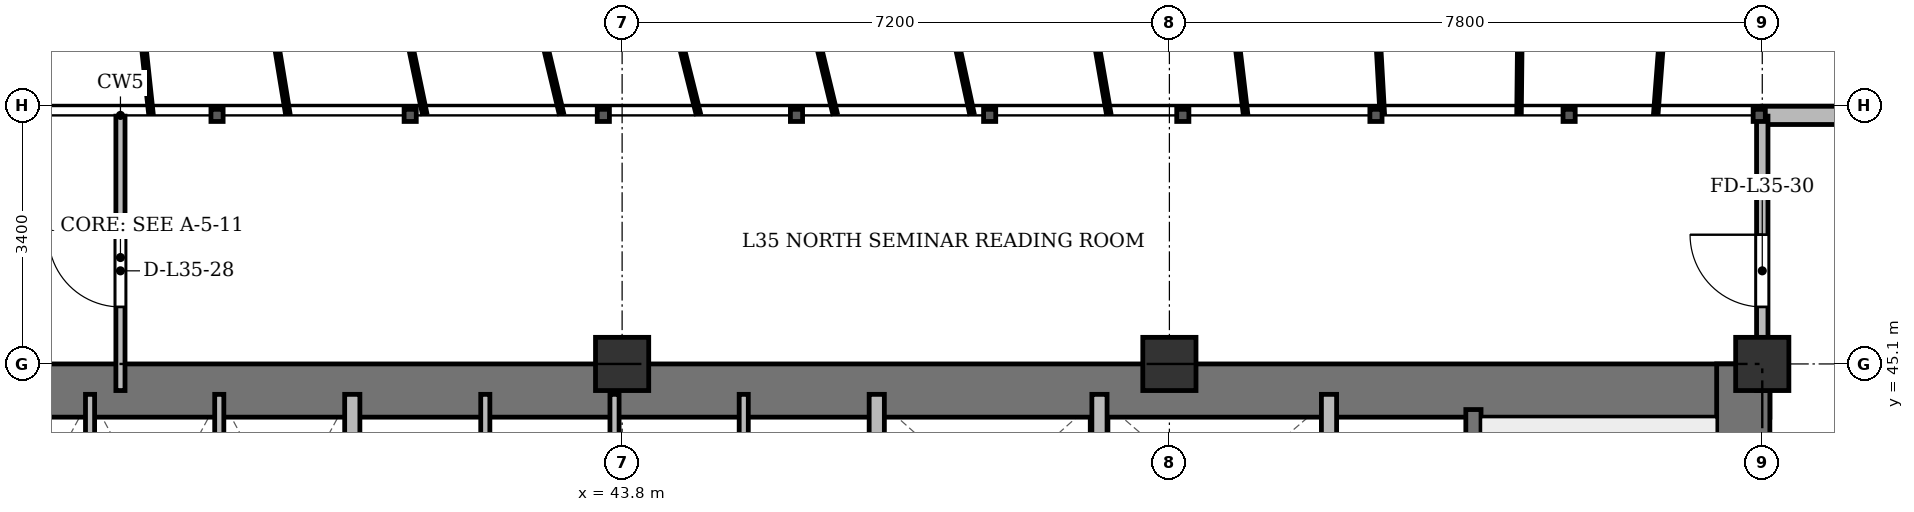
"""IFC4 building model, lengths in metres.
Left out: names, types, materials, properties, quantities, classifications, styles, units other than length and angle.
Written with IfcOpenShell. Run it as: python <this file> out.ifc"""

import sys

from ifc_helpers import new_model, si_unit, direction, frame, frame_2d, origin, origin_2d, place, context, subcontext, project, spatial, rectangle, extrude, source, transform, mapped, element, fill, save


model = new_model("IFC4")
c1 = context("Model", 3, precision=1e-05, world=origin(), true_north=direction((0.0, 1.0)))
c2 = subcontext(c1, "Body", "Model", "MODEL_VIEW")
j1 = project(units=[si_unit("LENGTHUNIT", "METRE"), si_unit("PLANEANGLEUNIT", "RADIAN")], contexts=[c1])
p1 = place(None, origin())
s1 = spatial("IfcSite", under=j1, at=p1, CompositionType="ELEMENT")
p2 = place(p1, origin())
s2 = spatial("IfcBuilding", under=s1, at=p2, CompositionType="ELEMENT")
p3 = place(p2, frame((0.0, 0.0, 135.7)))
s3 = spatial("IfcBuildingStorey", under=s2, at=p3, CompositionType="ELEMENT", Elevation=135.7)
m1 = source(origin(), c2, "Body", "SweptSolid", [
    extrude(rectangle(XDim=0.7, YDim=0.7, at=origin_2d()), origin(), (0.0, 0.0, 1.0), 3.6),
])
for number, where, z_axis, x_axis in (
    (1, (43.8, 45.1, 0.0), (0.0, 0.0, 1.0), (1.0, 0.0, 0.0)),
    (2, (51.0, 45.1, 0.0), (0.0, 0.0, 1.0), (1.0, 0.0, 0.0)),
    (3, (58.8, 45.1, 0.0), (0.0, 0.0, 1.0), (1.0, 0.0, 0.0)),
):
    element("IfcColumn", number, at=place(p3, frame(where, z_axis=z_axis, x_axis=x_axis)), inside=s3, PredefinedType="COLUMN", context=c2, shape_type="MappedRepresentation", body=[
        mapped(m1, transform((0.0, 0.0, 0.0), x_axis=(1.0, 0.0, 0.0), y_axis=(0.0, 1.0, 0.0), z_axis=(0.0, 0.0, 1.0), scale=1.0)),
    ])
p4 = place(p3, frame((58.8, 48.37, 0.0), z_axis=(0.0, 0.0, 1.0), x_axis=(1.0, 0.0, 0.0)))
e4 = element("IfcWall", 4, at=p4, inside=s3, PredefinedType="SOLIDWALL", context=c2, shape_type="SweptSolid", body=[
    extrude(rectangle(XDim=4.7, YDim=0.24, at=frame_2d((2.35, 0.0))), origin(), (0.0, 0.0, 1.0), 3.35),
])
p5 = place(p4, frame((1.293, 0.0, 0.9)))
e5 = element("IfcOpeningElement", 5, at=p5, cuts=e4, PredefinedType="OPENING", context=c2, shape_type="SweptSolid", body=[
    extrude(rectangle(XDim=1.35, YDim=1.5, at=frame_2d((0.675, 0.75))), frame((0.0, 0.13, 0.0), z_axis=(0.0, -1.0, 0.0), x_axis=(1.0, 0.0, 0.0)), (0.0, 0.0, 1.0), 0.26),
])
p6 = place(p3, frame((15.5, 44.75, 0.0), z_axis=(0.0, 0.0, 1.0), x_axis=(1.0, 0.0, 0.0)))
e6 = element("IfcWall", 6, at=p6, inside=s3, PredefinedType="SHEAR", context=c2, shape_type="SweptSolid", body=[
    extrude(rectangle(XDim=43.4, YDim=0.7, at=frame_2d((21.7, 0.0))), origin(), (0.0, 0.0, 1.0), 3.35),
])
p7 = place(p3, frame((58.55, 33.4, 0.0), z_axis=(0.0, 0.0, 1.0), x_axis=(0.0, 1.0, 0.0)))
e7 = element("IfcWall", 7, at=p7, inside=s3, PredefinedType="SHEAR", context=c2, shape_type="SweptSolid", body=[
    extrude(rectangle(XDim=11.7, YDim=0.7, at=frame_2d((5.85, 0.0))), origin(), (0.0, 0.0, 1.0), 3.35),
])
p8 = place(p3, frame((55.0, 33.4, 0.0), z_axis=(0.0, 0.0, 1.0), x_axis=(0.0, 1.0, 0.0)))
e8 = element("IfcWall", 8, at=p8, inside=s3, PredefinedType="SHEAR", context=c2, shape_type="SweptSolid", body=[
    extrude(rectangle(XDim=11.1, YDim=0.2, at=frame_2d((5.55, 0.0))), origin(), (0.0, 0.0, 1.0), 3.35),
])
p9 = place(p8, frame((0.85, 0.0, 0.0)))
e9 = element("IfcOpeningElement", 9, at=p9, cuts=e8, PredefinedType="OPENING", context=c2, shape_type="SweptSolid", body=[
    extrude(rectangle(XDim=1.1, YDim=2.15, at=frame_2d((0.55, 1.075))), frame((0.0, 0.11, 0.0), z_axis=(0.0, -1.0, 0.0), x_axis=(1.0, 0.0, 0.0)), (0.0, 0.0, 1.0), 0.22),
])
for number, where, z_axis, x_axis in (
    (10, (36.8, 41.5, 0.0), (0.0, 0.0, 1.0), (0.0, 1.0, 0.0)),
    (11, (38.5, 41.5, 0.0), (0.0, 0.0, 1.0), (0.0, 1.0, 0.0)),
):
    element("IfcWall", number, at=place(p3, frame(where, z_axis=z_axis, x_axis=x_axis)), inside=s3, PredefinedType="PARTITIONING", context=c2, shape_type="SweptSolid", body=[
        extrude(rectangle(XDim=3.2, YDim=0.12, at=frame_2d((1.6, 0.0))), origin(), (0.0, 0.0, 1.0), 3.35),
    ])
p10 = place(p3, frame((40.25, 41.5, 0.0), z_axis=(0.0, 0.0, 1.0), x_axis=(0.0, 1.0, 0.0)))
e12 = element("IfcWall", 12, at=p10, inside=s3, PredefinedType="SOLIDWALL", context=c2, shape_type="SweptSolid", body=[
    extrude(rectangle(XDim=3.2, YDim=0.2, at=frame_2d((1.6, 0.0))), origin(), (0.0, 0.0, 1.0), 3.35),
])
p11 = place(p3, frame((42.0, 41.5, 0.0), z_axis=(0.0, 0.0, 1.0), x_axis=(0.0, 1.0, 0.0)))
e13 = element("IfcWall", 13, at=p11, inside=s3, PredefinedType="PARTITIONING", context=c2, shape_type="SweptSolid", body=[
    extrude(rectangle(XDim=3.2, YDim=0.12, at=frame_2d((1.6, 0.0))), origin(), (0.0, 0.0, 1.0), 3.35),
])
p12 = place(p3, frame((43.7, 41.5, 0.0), z_axis=(0.0, 0.0, 1.0), x_axis=(0.0, 1.0, 0.0)))
e14 = element("IfcWall", 14, at=p12, inside=s3, PredefinedType="PARTITIONING", context=c2, shape_type="SweptSolid", body=[
    extrude(rectangle(XDim=3.2, YDim=0.12, at=frame_2d((1.6, 0.0))), origin(), (0.0, 0.0, 1.0), 2.85),
])
p13 = place(p3, frame((45.4, 41.5, 0.0), z_axis=(0.0, 0.0, 1.0), x_axis=(0.0, 1.0, 0.0)))
e15 = element("IfcWall", 15, at=p13, inside=s3, PredefinedType="PARTITIONING", context=c2, shape_type="SweptSolid", body=[
    extrude(rectangle(XDim=3.2, YDim=0.12, at=frame_2d((1.6, 0.0))), origin(), (0.0, 0.0, 1.0), 3.35),
])
p14 = place(p3, frame((47.15, 33.4, 0.0), z_axis=(0.0, 0.0, 1.0), x_axis=(0.0, 1.0, 0.0)))
e16 = element("IfcWall", 16, at=p14, inside=s3, PredefinedType="SOLIDWALL", context=c2, shape_type="SweptSolid", body=[
    extrude(rectangle(XDim=11.3, YDim=0.2, at=frame_2d((5.65, 0.0))), origin(), (0.0, 0.0, 1.0), 2.75),
])
for number, where, z_axis, x_axis in (
    (17, (50.08, 42.05, 0.0), (0.0, 0.0, 1.0), (0.0, 1.0, 0.0)),
    (18, (53.1, 42.05, 0.0), (0.0, 0.0, 1.0), (0.0, 1.0, 0.0)),
):
    element("IfcWall", number, at=place(p3, frame(where, z_axis=z_axis, x_axis=x_axis)), inside=s3, PredefinedType="SOLIDWALL", context=c2, shape_type="SweptSolid", body=[
        extrude(rectangle(XDim=2.65, YDim=0.2, at=frame_2d((1.325, 0.0))), origin(), (0.0, 0.0, 1.0), 3.35),
    ])
p15 = place(p3, frame((37.2, 44.75, 0.0), z_axis=(0.0, 0.0, 1.0), x_axis=(0.0, 1.0, 0.0)))
e19 = element("IfcWall", 19, at=p15, inside=s3, PredefinedType="PARTITIONING", context=c2, shape_type="SweptSolid", body=[
    extrude(rectangle(XDim=3.61, YDim=0.12, at=frame_2d((1.805, 0.0))), origin(), (0.0, 0.0, 1.0), 2.75),
])
p16 = place(p15, frame((1.1, 0.0, 0.0)))
e20 = element("IfcOpeningElement", 20, at=p16, cuts=e19, PredefinedType="OPENING", context=c2, shape_type="SweptSolid", body=[
    extrude(rectangle(XDim=0.95, YDim=2.15, at=frame_2d((0.475, 1.075))), frame((0.0, 0.07, 0.0), z_axis=(0.0, -1.0, 0.0), x_axis=(1.0, 0.0, 0.0)), (0.0, 0.0, 1.0), 0.14),
])
p17 = place(p3, frame((58.8, 44.75, 0.0), z_axis=(0.0, 0.0, 1.0), x_axis=(0.0, 1.0, 0.0)))
e21 = element("IfcWall", 21, at=p17, inside=s3, PredefinedType="PARTITIONING", context=c2, shape_type="SweptSolid", body=[
    extrude(rectangle(XDim=3.61, YDim=0.15, at=frame_2d((1.805, 0.0))), origin(), (0.0, 0.0, 1.0), 2.85),
])
p18 = place(p17, frame((1.1, 0.0, 0.0)))
e22 = element("IfcOpeningElement", 22, at=p18, cuts=e21, PredefinedType="OPENING", context=c2, shape_type="SweptSolid", body=[
    extrude(rectangle(XDim=0.95, YDim=2.15, at=frame_2d((0.475, 1.075))), frame((0.0, 0.085, 0.0), z_axis=(0.0, -1.0, 0.0), x_axis=(1.0, 0.0, 0.0)), (0.0, 0.0, 1.0), 0.17),
])
m2 = source(origin(), c2, "Body", "SweptSolid", [
    extrude(rectangle(XDim=0.95, YDim=2.15, at=frame_2d((0.475, 1.075))), frame((0.0, 0.025, 0.0), z_axis=(0.0, -1.0, 0.0), x_axis=(1.0, 0.0, 0.0)), (0.0, 0.0, 1.0), 0.05),
])
p19 = place(p16, origin())
e23 = element("IfcDoor", 23, at=p19, inside=s3, OperationType="SINGLE_SWING_RIGHT", PredefinedType="DOOR", context=c2, shape_type="MappedRepresentation", body=[
    mapped(m2, transform((0.0, 0.0, 0.0), x_axis=(1.0, 0.0, 0.0), y_axis=(0.0, 1.0, 0.0), z_axis=(0.0, 0.0, 1.0), scale=1.0)),
])
fill(e20, e23)
p20 = place(p18, origin())
e24 = element("IfcDoor", 24, at=p20, inside=s3, OperationType="SINGLE_SWING_RIGHT", PredefinedType="DOOR", context=c2, shape_type="MappedRepresentation", body=[
    mapped(m2, transform((0.0, 0.0, 0.0), x_axis=(1.0, 0.0, 0.0), y_axis=(0.0, 1.0, 0.0), z_axis=(0.0, 0.0, 1.0), scale=1.0)),
])
fill(e22, e24)
save(model, sys.argv[1])
